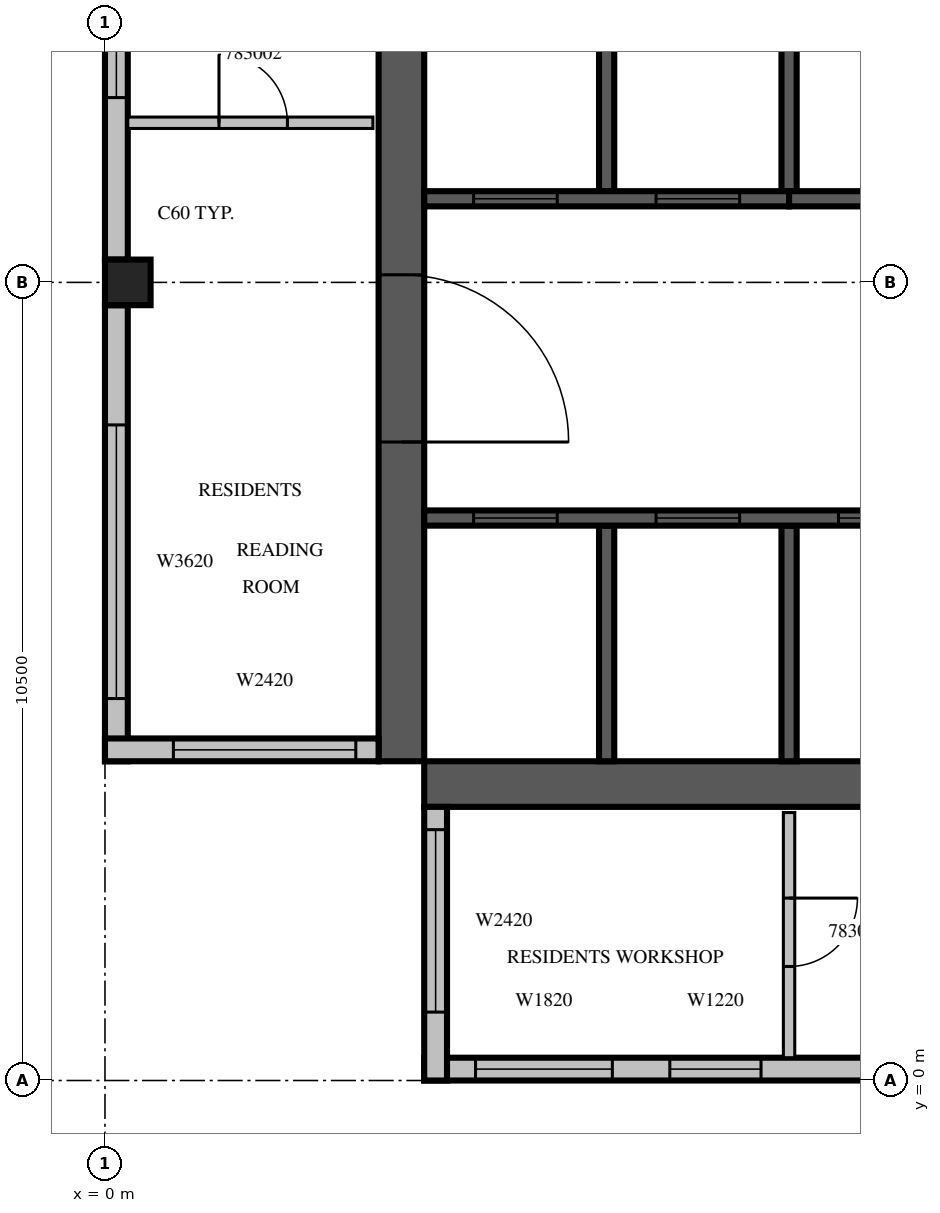
"""IFC4 building model, lengths in metres.
Left out: names, types, materials, properties, quantities, classifications, styles, units other than length and angle.
Written with IfcOpenShell. Run it as: python <this file> out.ifc"""

import sys

from ifc_helpers import new_model, si_unit, direction, frame, frame_2d, origin, origin_2d, place, context, subcontext, project, spatial, rectangle, extrude, source, transform, mapped, element, fill, save


model = new_model("IFC4")
c1 = context("Model", 3, precision=1e-05, world=origin(), true_north=direction((0.0, 1.0)))
c2 = subcontext(c1, "Body", "Model", "MODEL_VIEW")
j1 = project(units=[si_unit("LENGTHUNIT", "METRE"), si_unit("PLANEANGLEUNIT", "RADIAN")], contexts=[c1])
p1 = place(None, origin())
s1 = spatial("IfcSite", under=j1, at=p1, CompositionType="ELEMENT")
p2 = place(p1, origin())
s2 = spatial("IfcBuilding", under=s1, at=p2, CompositionType="ELEMENT")
p3 = place(p2, frame((0.0, 0.0, 351.0)))
s3 = spatial("IfcBuildingStorey", under=s2, at=p3, CompositionType="ELEMENT", Elevation=351.0)
m1 = source(origin(), c2, "Body", "SweptSolid", [
    extrude(rectangle(XDim=0.6, YDim=0.6, at=origin_2d()), origin(), (0.0, 0.0, 1.0), 3.5),
])
p4 = place(p3, frame((0.3, 10.5, 0.0), z_axis=(0.0, 0.0, 1.0), x_axis=(1.0, 0.0, 0.0)))
e1 = element("IfcColumn", 1, at=p4, inside=s3, PredefinedType="COLUMN", context=c2, shape_type="MappedRepresentation", body=[
    mapped(m1, transform((0.0, 0.0, 0.0), scale=1.0)),
])
m2 = source(origin(), c2, "Body", "SweptSolid", [
    extrude(rectangle(XDim=17.4, YDim=0.6, at=frame_2d((8.7, 0.0))), origin(), (0.0, 0.0, 1.0), 3.5),
])
p5 = place(p3, frame((3.9, 4.2, 0.0), z_axis=(0.0, 0.0, 1.0), x_axis=(0.0, 1.0, 0.0)))
e2 = element("IfcWall", 2, at=p5, inside=s3, PredefinedType="SHEAR", context=c2, shape_type="MappedRepresentation", body=[
    mapped(m2, transform((0.0, 0.0, 0.0), scale=1.0)),
])
m3 = source(origin(), c2, "Body", "SweptSolid", [
    extrude(rectangle(XDim=2.2, YDim=2.1, at=frame_2d((1.1, 1.05))), frame((0.0, 0.31, 0.0), z_axis=(0.0, -1.0, 0.0), x_axis=(1.0, 0.0, 0.0)), (0.0, 0.0, 1.0), 0.62),
])
p6 = place(p5, frame((4.2, 0.0, 0.0)))
e3 = element("IfcOpeningElement", 3, at=p6, cuts=e2, PredefinedType="OPENING", context=c2, shape_type="MappedRepresentation", body=[
    mapped(m3, transform((0.0, 0.0, 0.0), scale=1.0)),
])
p7 = place(p3, frame((4.2, 3.9, 0.0), z_axis=(0.0, 0.0, 1.0), x_axis=(1.0, 0.0, 0.0)))
e4 = element("IfcWall", 4, at=p7, inside=s3, PredefinedType="SHEAR", context=c2, shape_type="MappedRepresentation", body=[
    mapped(m2, transform((0.0, 0.0, 0.0), scale=1.0)),
])
m4 = source(origin(), c2, "Body", "SweptSolid", [
    extrude(rectangle(XDim=0.9, YDim=2.1, at=frame_2d((0.45, 1.05))), frame((0.0, 0.31, 0.0), z_axis=(0.0, -1.0, 0.0), x_axis=(1.0, 0.0, 0.0)), (0.0, 0.0, 1.0), 0.62),
])
p8 = place(p7, frame((12.8, 0.0, 0.0)))
e5 = element("IfcOpeningElement", 5, at=p8, cuts=e4, PredefinedType="OPENING", context=c2, shape_type="MappedRepresentation", body=[
    mapped(m4, transform((0.0, 0.0, 0.0), scale=1.0)),
])
m5 = source(origin(), c2, "Body", "SweptSolid", [
    extrude(rectangle(XDim=6.0, YDim=0.3, at=frame_2d((3.0, 0.0))), origin(), (0.0, 0.0, 1.0), 3.1),
])
p9 = place(p3, frame((4.2, 0.15, 0.0), z_axis=(0.0, 0.0, 1.0), x_axis=(1.0, 0.0, 0.0)))
e6 = element("IfcWall", 6, at=p9, inside=s3, PredefinedType="STANDARD", context=c2, shape_type="MappedRepresentation", body=[
    mapped(m5, transform((0.0, 0.0, 0.0), scale=1.0)),
])
m6 = source(origin(), c2, "Body", "SweptSolid", [
    extrude(rectangle(XDim=1.8, YDim=2.0, at=frame_2d((0.9, 1.0))), frame((0.0, 0.16, 0.0), z_axis=(0.0, -1.0, 0.0), x_axis=(1.0, 0.0, 0.0)), (0.0, 0.0, 1.0), 0.32),
])
p10 = place(p9, frame((0.675, 0.0, 0.6)))
e7 = element("IfcOpeningElement", 7, at=p10, cuts=e6, PredefinedType="OPENING", context=c2, shape_type="MappedRepresentation", body=[
    mapped(m6, transform((0.0, 0.0, 0.0), scale=1.0)),
])
m7 = source(origin(), c2, "Body", "SweptSolid", [
    extrude(rectangle(XDim=1.2, YDim=2.0, at=frame_2d((0.6, 1.0))), frame((0.0, 0.16, 0.0), z_axis=(0.0, -1.0, 0.0), x_axis=(1.0, 0.0, 0.0)), (0.0, 0.0, 1.0), 0.32),
])
p11 = place(p9, frame((3.231, 0.0, 0.6)))
e8 = element("IfcOpeningElement", 8, at=p11, cuts=e6, PredefinedType="OPENING", context=c2, shape_type="MappedRepresentation", body=[
    mapped(m7, transform((0.0, 0.0, 0.0), scale=1.0)),
])
m8 = source(origin(), c2, "Body", "SweptSolid", [
    extrude(rectangle(XDim=9.6, YDim=0.3, at=frame_2d((4.8, 0.0))), origin(), (0.0, 0.0, 1.0), 3.1),
])
p12 = place(p3, frame((0.15, 20.4, 0.0), z_axis=(0.0, 0.0, 1.0), x_axis=(0.0, -1.0, 0.0)))
e9 = element("IfcWall", 9, at=p12, inside=s3, PredefinedType="STANDARD", context=c2, shape_type="MappedRepresentation", body=[
    mapped(m8, transform((0.0, 0.0, 0.0), scale=1.0)),
])
p13 = place(p12, frame((0.375, 0.0, 0.6)))
e10 = element("IfcOpeningElement", 10, at=p13, cuts=e9, PredefinedType="OPENING", context=c2, shape_type="MappedRepresentation", body=[
    mapped(m7, transform((0.0, 0.0, 0.0), scale=1.0)),
])
p14 = place(p12, frame((3.225, 0.0, 0.6)))
e11 = element("IfcOpeningElement", 11, at=p14, cuts=e9, PredefinedType="OPENING", context=c2, shape_type="MappedRepresentation", body=[
    mapped(m6, transform((0.0, 0.0, 0.0), scale=1.0)),
])
p15 = place(p12, frame((6.269, 0.0, 0.6)))
e12 = element("IfcOpeningElement", 12, at=p15, cuts=e9, PredefinedType="OPENING", context=c2, shape_type="MappedRepresentation", body=[
    mapped(m7, transform((0.0, 0.0, 0.0), scale=1.0)),
])
p16 = place(p3, frame((0.15, 10.2, 0.0), z_axis=(0.0, 0.0, 1.0), x_axis=(0.0, -1.0, 0.0)))
e13 = element("IfcWall", 13, at=p16, inside=s3, PredefinedType="STANDARD", context=c2, shape_type="MappedRepresentation", body=[
    mapped(m5, transform((0.0, 0.0, 0.0), scale=1.0)),
])
m9 = source(origin(), c2, "Body", "SweptSolid", [
    extrude(rectangle(XDim=3.6, YDim=2.0, at=frame_2d((1.8, 1.0))), frame((0.0, 0.16, 0.0), z_axis=(0.0, -1.0, 0.0), x_axis=(1.0, 0.0, 0.0)), (0.0, 0.0, 1.0), 0.32),
])
p17 = place(p16, frame((1.575, 0.0, 0.6)))
e14 = element("IfcOpeningElement", 14, at=p17, cuts=e13, PredefinedType="OPENING", context=c2, shape_type="MappedRepresentation", body=[
    mapped(m9, transform((0.0, 0.0, 0.0), scale=1.0)),
])
m10 = source(origin(), c2, "Body", "SweptSolid", [
    extrude(rectangle(XDim=3.6, YDim=0.3, at=frame_2d((1.8, 0.0))), origin(), (0.0, 0.0, 1.0), 3.1),
])
p18 = place(p3, frame((0.0, 4.35, 0.0), z_axis=(0.0, 0.0, 1.0), x_axis=(1.0, 0.0, 0.0)))
e15 = element("IfcWall", 15, at=p18, inside=s3, PredefinedType="STANDARD", context=c2, shape_type="MappedRepresentation", body=[
    mapped(m10, transform((0.0, 0.0, 0.0), scale=1.0)),
])
m11 = source(origin(), c2, "Body", "SweptSolid", [
    extrude(rectangle(XDim=2.4, YDim=2.0, at=frame_2d((1.2, 1.0))), frame((0.0, 0.16, 0.0), z_axis=(0.0, -1.0, 0.0), x_axis=(1.0, 0.0, 0.0)), (0.0, 0.0, 1.0), 0.32),
])
p19 = place(p18, frame((0.9, 0.0, 0.6)))
e16 = element("IfcOpeningElement", 16, at=p19, cuts=e15, PredefinedType="OPENING", context=c2, shape_type="MappedRepresentation", body=[
    mapped(m11, transform((0.0, 0.0, 0.0), scale=1.0)),
])
p20 = place(p3, frame((4.35, 3.6, 0.0), z_axis=(0.0, 0.0, 1.0), x_axis=(0.0, -1.0, 0.0)))
e17 = element("IfcWall", 17, at=p20, inside=s3, PredefinedType="STANDARD", context=c2, shape_type="MappedRepresentation", body=[
    mapped(m10, transform((0.0, 0.0, 0.0), scale=1.0)),
])
p21 = place(p20, frame((0.3, 0.0, 0.6)))
e18 = element("IfcOpeningElement", 18, at=p21, cuts=e17, PredefinedType="OPENING", context=c2, shape_type="MappedRepresentation", body=[
    mapped(m11, transform((0.0, 0.0, 0.0), scale=1.0)),
])
m12 = source(origin(), c2, "Body", "SweptSolid", [
    extrude(rectangle(XDim=3.1, YDim=0.2, at=frame_2d((1.55, 0.0))), origin(), (0.0, 0.0, 1.0), 3.5),
])
for number, where, z_axis, x_axis in (
    (19, (6.6, 4.2, 0.0), (0.0, 0.0, 1.0), (0.0, 1.0, 0.0)),
    (20, (9.0, 4.2, 0.0), (0.0, 0.0, 1.0), (0.0, 1.0, 0.0)),
):
    element("IfcWall", number, at=place(p3, frame(where, z_axis=z_axis, x_axis=x_axis)), inside=s3, PredefinedType="SOLIDWALL", context=c2, shape_type="MappedRepresentation", body=[
        mapped(m12, transform((0.0, 0.0, 0.0), scale=1.0)),
    ])
m13 = source(origin(), c2, "Body", "SweptSolid", [
    extrude(rectangle(XDim=3.0, YDim=0.2, at=frame_2d((1.5, 0.0))), origin(), (0.0, 0.0, 1.0), 3.5),
])
p22 = place(p3, frame((6.6, 11.7, 0.0), z_axis=(0.0, 0.0, 1.0), x_axis=(0.0, 1.0, 0.0)))
e21 = element("IfcWall", 21, at=p22, inside=s3, PredefinedType="SOLIDWALL", context=c2, shape_type="MappedRepresentation", body=[
    mapped(m13, transform((0.0, 0.0, 0.0), scale=1.0)),
])
m14 = source(origin(), c2, "Body", "SweptSolid", [
    extrude(rectangle(XDim=3.0, YDim=0.2, at=frame_2d((1.5, 0.0))), origin(), (0.0, 0.0, 1.0), 3.1),
])
p23 = place(p3, frame((9.0, 11.7, 0.0), z_axis=(0.0, 0.0, 1.0), x_axis=(0.0, 1.0, 0.0)))
e22 = element("IfcWall", 22, at=p23, inside=s3, PredefinedType="SOLIDWALL", context=c2, shape_type="MappedRepresentation", body=[
    mapped(m14, transform((0.0, 0.0, 0.0), scale=1.0)),
])
m15 = source(origin(), c2, "Body", "SweptSolid", [
    extrude(rectangle(XDim=9.6, YDim=0.2, at=frame_2d((4.8, 0.0))), origin(), (0.0, 0.0, 1.0), 3.5),
])
p24 = place(p3, frame((4.2, 7.4, 0.0), z_axis=(0.0, 0.0, 1.0), x_axis=(1.0, 0.0, 0.0)))
e23 = element("IfcWall", 23, at=p24, inside=s3, PredefinedType="SOLIDWALL", context=c2, shape_type="MappedRepresentation", body=[
    mapped(m15, transform((0.0, 0.0, 0.0), scale=1.0)),
])
m16 = source(origin(), c2, "Body", "SweptSolid", [
    extrude(rectangle(XDim=1.1, YDim=2.1, at=frame_2d((0.55, 1.05))), frame((0.0, 0.11, 0.0), z_axis=(0.0, -1.0, 0.0), x_axis=(1.0, 0.0, 0.0)), (0.0, 0.0, 1.0), 0.22),
])
p25 = place(p24, frame((0.65, 0.0, 0.0)))
e24 = element("IfcOpeningElement", 24, at=p25, cuts=e23, PredefinedType="OPENING", context=c2, shape_type="MappedRepresentation", body=[
    mapped(m16, transform((0.0, 0.0, 0.0), scale=1.0)),
])
p26 = place(p24, frame((3.05, 0.0, 0.0)))
e25 = element("IfcOpeningElement", 25, at=p26, cuts=e23, PredefinedType="OPENING", context=c2, shape_type="MappedRepresentation", body=[
    mapped(m16, transform((0.0, 0.0, 0.0), scale=1.0)),
])
p27 = place(p24, frame((5.45, 0.0, 0.0)))
e26 = element("IfcOpeningElement", 26, at=p27, cuts=e23, PredefinedType="OPENING", context=c2, shape_type="MappedRepresentation", body=[
    mapped(m16, transform((0.0, 0.0, 0.0), scale=1.0)),
])
p28 = place(p24, frame((7.85, 0.0, 0.0)))
e27 = element("IfcOpeningElement", 27, at=p28, cuts=e23, PredefinedType="OPENING", context=c2, shape_type="MappedRepresentation", body=[
    mapped(m16, transform((0.0, 0.0, 0.0), scale=1.0)),
])
m17 = source(origin(), c2, "Body", "SweptSolid", [
    extrude(rectangle(XDim=4.8, YDim=0.2, at=frame_2d((2.4, 0.0))), origin(), (0.0, 0.0, 1.0), 3.5),
])
p29 = place(p3, frame((4.2, 11.6, 0.0), z_axis=(0.0, 0.0, 1.0), x_axis=(1.0, 0.0, 0.0)))
e28 = element("IfcWall", 28, at=p29, inside=s3, PredefinedType="SOLIDWALL", context=c2, shape_type="MappedRepresentation", body=[
    mapped(m17, transform((0.0, 0.0, 0.0), scale=1.0)),
])
p30 = place(p29, frame((0.65, 0.0, 0.0)))
e29 = element("IfcOpeningElement", 29, at=p30, cuts=e28, PredefinedType="OPENING", context=c2, shape_type="MappedRepresentation", body=[
    mapped(m16, transform((0.0, 0.0, 0.0), scale=1.0)),
])
p31 = place(p29, frame((3.05, 0.0, 0.0)))
e30 = element("IfcOpeningElement", 30, at=p31, cuts=e28, PredefinedType="OPENING", context=c2, shape_type="MappedRepresentation", body=[
    mapped(m16, transform((0.0, 0.0, 0.0), scale=1.0)),
])
m18 = source(origin(), c2, "Body", "SweptSolid", [
    extrude(rectangle(XDim=4.8, YDim=0.2, at=frame_2d((2.4, 0.0))), origin(), (0.0, 0.0, 1.0), 3.1),
])
p32 = place(p3, frame((9.0, 11.6, 0.0), z_axis=(0.0, 0.0, 1.0), x_axis=(1.0, 0.0, 0.0)))
e31 = element("IfcWall", 31, at=p32, inside=s3, PredefinedType="SOLIDWALL", context=c2, shape_type="MappedRepresentation", body=[
    mapped(m18, transform((0.0, 0.0, 0.0), scale=1.0)),
])
m19 = source(origin(), c2, "Body", "SweptSolid", [
    extrude(rectangle(XDim=0.9, YDim=2.1, at=frame_2d((0.45, 1.05))), frame((0.0, 0.11, 0.0), z_axis=(0.0, -1.0, 0.0), x_axis=(1.0, 0.0, 0.0)), (0.0, 0.0, 1.0), 0.22),
])
p33 = place(p32, frame((1.95, 0.0, 0.0)))
e32 = element("IfcOpeningElement", 32, at=p33, cuts=e31, PredefinedType="OPENING", context=c2, shape_type="MappedRepresentation", body=[
    mapped(m19, transform((0.0, 0.0, 0.0), scale=1.0)),
])
m20 = source(origin(), c2, "Body", "SweptSolid", [
    extrude(rectangle(XDim=3.225, YDim=0.15, at=frame_2d((1.613, 0.0))), origin(), (0.0, 0.0, 1.0), 3.1),
])
p34 = place(p3, frame((9.0, 3.525, 0.0), z_axis=(0.0, 0.0, 1.0), x_axis=(0.0, -1.0, 0.0)))
e33 = element("IfcWall", 33, at=p34, inside=s3, PredefinedType="PARTITIONING", context=c2, shape_type="MappedRepresentation", body=[
    mapped(m20, transform((0.0, 0.0, 0.0), scale=1.0)),
])
m21 = source(origin(), c2, "Body", "SweptSolid", [
    extrude(rectangle(XDim=0.9, YDim=2.1, at=frame_2d((0.45, 1.05))), frame((0.0, 0.085, 0.0), z_axis=(0.0, -1.0, 0.0), x_axis=(1.0, 0.0, 0.0)), (0.0, 0.0, 1.0), 0.17),
])
p35 = place(p34, frame((1.125, 0.0, 0.0)))
e34 = element("IfcOpeningElement", 34, at=p35, cuts=e33, PredefinedType="OPENING", context=c2, shape_type="MappedRepresentation", body=[
    mapped(m21, transform((0.0, 0.0, 0.0), scale=1.0)),
])
p36 = place(p3, frame((0.3, 12.6, 0.0), z_axis=(0.0, 0.0, 1.0), x_axis=(1.0, 0.0, 0.0)))
e35 = element("IfcWall", 35, at=p36, inside=s3, PredefinedType="PARTITIONING", context=c2, shape_type="MappedRepresentation", body=[
    mapped(m20, transform((0.0, 0.0, 0.0), scale=1.0)),
])
p37 = place(p36, frame((1.2, 0.0, 0.0)))
e36 = element("IfcOpeningElement", 36, at=p37, cuts=e35, PredefinedType="OPENING", context=c2, shape_type="MappedRepresentation", body=[
    mapped(m21, transform((0.0, 0.0, 0.0), scale=1.0)),
])
m22 = source(origin(), c2, "Body", "SweptSolid", [
    extrude(rectangle(XDim=1.8, YDim=2.0, at=frame_2d((0.9, 1.0))), frame((0.0, 0.03, 0.0), z_axis=(0.0, -1.0, 0.0), x_axis=(1.0, 0.0, 0.0)), (0.0, 0.0, 1.0), 0.06),
])
p38 = place(p10, origin())
e37 = element("IfcWindow", 37, at=p38, inside=s3, PartitioningType="SINGLE_PANEL", PredefinedType="WINDOW", context=c2, shape_type="MappedRepresentation", body=[
    mapped(m22, transform((0.0, 0.0, 0.0), scale=1.0)),
])
fill(e7, e37)
m23 = source(origin(), c2, "Body", "SweptSolid", [
    extrude(rectangle(XDim=1.2, YDim=2.0, at=frame_2d((0.6, 1.0))), frame((0.0, 0.03, 0.0), z_axis=(0.0, -1.0, 0.0), x_axis=(1.0, 0.0, 0.0)), (0.0, 0.0, 1.0), 0.06),
])
p39 = place(p11, origin())
e38 = element("IfcWindow", 38, at=p39, inside=s3, PartitioningType="SINGLE_PANEL", PredefinedType="WINDOW", context=c2, shape_type="MappedRepresentation", body=[
    mapped(m23, transform((0.0, 0.0, 0.0), scale=1.0)),
])
fill(e8, e38)
m24 = source(origin(), c2, "Body", "SweptSolid", [
    extrude(rectangle(XDim=3.6, YDim=2.0, at=frame_2d((1.8, 1.0))), frame((0.0, 0.03, 0.0), z_axis=(0.0, -1.0, 0.0), x_axis=(1.0, 0.0, 0.0)), (0.0, 0.0, 1.0), 0.06),
])
p40 = place(p17, origin())
e39 = element("IfcWindow", 39, at=p40, inside=s3, PartitioningType="SINGLE_PANEL", PredefinedType="WINDOW", context=c2, shape_type="MappedRepresentation", body=[
    mapped(m24, transform((0.0, 0.0, 0.0), scale=1.0)),
])
fill(e14, e39)
p41 = place(p15, origin())
e40 = element("IfcWindow", 40, at=p41, inside=s3, PartitioningType="SINGLE_PANEL", PredefinedType="WINDOW", context=c2, shape_type="MappedRepresentation", body=[
    mapped(m23, transform((0.0, 0.0, 0.0), scale=1.0)),
])
fill(e12, e40)
m25 = source(origin(), c2, "Body", "SweptSolid", [
    extrude(rectangle(XDim=2.4, YDim=2.0, at=frame_2d((1.2, 1.0))), frame((0.0, 0.03, 0.0), z_axis=(0.0, -1.0, 0.0), x_axis=(1.0, 0.0, 0.0)), (0.0, 0.0, 1.0), 0.06),
])
p42 = place(p19, origin())
e41 = element("IfcWindow", 41, at=p42, inside=s3, PartitioningType="SINGLE_PANEL", PredefinedType="WINDOW", context=c2, shape_type="MappedRepresentation", body=[
    mapped(m25, transform((0.0, 0.0, 0.0), scale=1.0)),
])
fill(e16, e41)
p43 = place(p21, origin())
e42 = element("IfcWindow", 42, at=p43, inside=s3, PartitioningType="SINGLE_PANEL", PredefinedType="WINDOW", context=c2, shape_type="MappedRepresentation", body=[
    mapped(m25, transform((0.0, 0.0, 0.0), scale=1.0)),
])
fill(e18, e42)
m26 = source(origin(), c2, "Body", "SweptSolid", [
    extrude(rectangle(XDim=1.1, YDim=2.1, at=frame_2d((0.55, 1.05))), frame((0.0, 0.025, 0.0), z_axis=(0.0, -1.0, 0.0), x_axis=(1.0, 0.0, 0.0)), (0.0, 0.0, 1.0), 0.05),
])
p44 = place(p25, origin())
e43 = element("IfcDoor", 43, at=p44, inside=s3, OperationType="SLIDING_TO_LEFT", PredefinedType="DOOR", context=c2, shape_type="MappedRepresentation", body=[
    mapped(m26, transform((0.0, 0.0, 0.0), scale=1.0)),
])
fill(e24, e43)
p45 = place(p26, origin())
e44 = element("IfcDoor", 44, at=p45, inside=s3, OperationType="SLIDING_TO_LEFT", PredefinedType="DOOR", context=c2, shape_type="MappedRepresentation", body=[
    mapped(m26, transform((0.0, 0.0, 0.0), scale=1.0)),
])
fill(e25, e44)
p46 = place(p27, origin())
e45 = element("IfcDoor", 45, at=p46, inside=s3, OperationType="SLIDING_TO_LEFT", PredefinedType="DOOR", context=c2, shape_type="MappedRepresentation", body=[
    mapped(m26, transform((0.0, 0.0, 0.0), scale=1.0)),
])
fill(e26, e45)
p47 = place(p30, origin())
e46 = element("IfcDoor", 46, at=p47, inside=s3, OperationType="SLIDING_TO_LEFT", PredefinedType="DOOR", context=c2, shape_type="MappedRepresentation", body=[
    mapped(m26, transform((0.0, 0.0, 0.0), scale=1.0)),
])
fill(e29, e46)
p48 = place(p31, origin())
e47 = element("IfcDoor", 47, at=p48, inside=s3, OperationType="SLIDING_TO_LEFT", PredefinedType="DOOR", context=c2, shape_type="MappedRepresentation", body=[
    mapped(m26, transform((0.0, 0.0, 0.0), scale=1.0)),
])
fill(e30, e47)
m27 = source(origin(), c2, "Body", "SweptSolid", [
    extrude(rectangle(XDim=2.2, YDim=2.1, at=frame_2d((1.1, 1.05))), frame((0.0, 0.025, 0.0), z_axis=(0.0, -1.0, 0.0), x_axis=(1.0, 0.0, 0.0)), (0.0, 0.0, 1.0), 0.05),
])
p49 = place(p6, origin())
e48 = element("IfcDoor", 48, at=p49, inside=s3, OperationType="DOUBLE_DOOR_SINGLE_SWING", PredefinedType="DOOR", context=c2, shape_type="MappedRepresentation", body=[
    mapped(m27, transform((0.0, 0.0, 0.0), scale=1.0)),
])
fill(e3, e48)
m28 = source(origin(), c2, "Body", "SweptSolid", [
    extrude(rectangle(XDim=0.9, YDim=2.1, at=frame_2d((0.45, 1.05))), frame((0.0, 0.025, 0.0), z_axis=(0.0, -1.0, 0.0), x_axis=(1.0, 0.0, 0.0)), (0.0, 0.0, 1.0), 0.05),
])
p50 = place(p35, origin())
e49 = element("IfcDoor", 49, at=p50, inside=s3, OperationType="SINGLE_SWING_LEFT", PredefinedType="DOOR", context=c2, shape_type="MappedRepresentation", body=[
    mapped(m28, transform((0.0, 0.0, 0.0), scale=1.0)),
])
fill(e34, e49)
p51 = place(p37, origin())
e50 = element("IfcDoor", 50, at=p51, inside=s3, OperationType="SINGLE_SWING_LEFT", PredefinedType="DOOR", context=c2, shape_type="MappedRepresentation", body=[
    mapped(m28, transform((0.0, 0.0, 0.0), scale=1.0)),
])
fill(e36, e50)
save(model, sys.argv[1])
